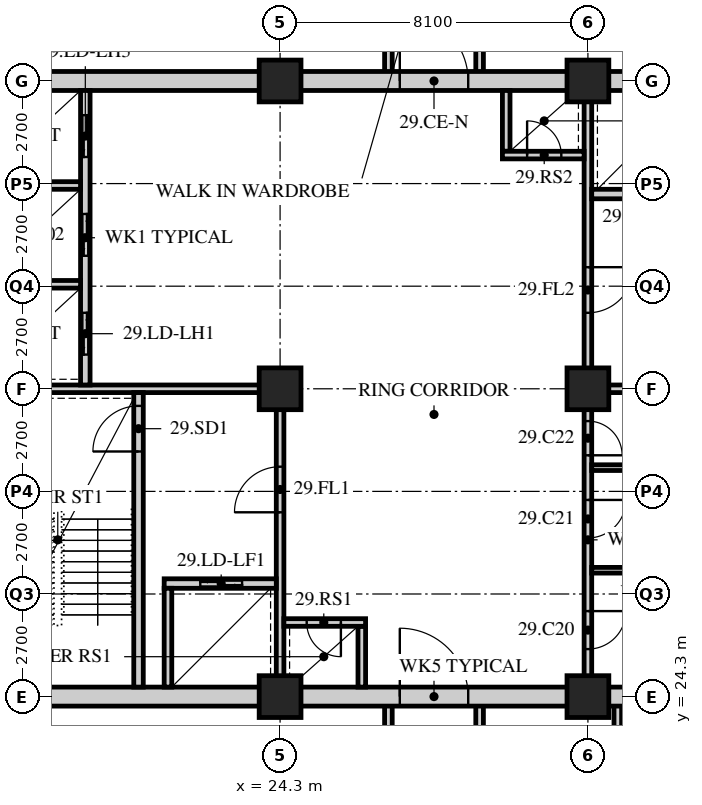
"""IFC4 building model, lengths in metres.
Left out: names, types, materials, properties, quantities, classifications, styles, units other than length and angle.
Written with IfcOpenShell. Run it as: python <this file> out.ifc"""

import sys

from ifc_helpers import new_model, si_unit, direction, frame, frame_2d, origin, origin_2d, place, context, subcontext, project, spatial, rectangle, hollow_rectangle, extrude, element, fill, save


model = new_model("IFC4")
c1 = context("Model", 3, precision=1e-05, world=origin(), true_north=direction((0.0, 1.0)))
c2 = subcontext(c1, "Body", "Model", "MODEL_VIEW")
j1 = project(units=[si_unit("LENGTHUNIT", "METRE"), si_unit("PLANEANGLEUNIT", "RADIAN")], contexts=[c1])
p1 = place(None, origin())
s1 = spatial("IfcSite", under=j1, at=p1, CompositionType="ELEMENT")
p2 = place(p1, origin())
s2 = spatial("IfcBuilding", under=s1, at=p2, CompositionType="ELEMENT")
p3 = place(p2, frame((0.0, 0.0, 117.0)))
s3 = spatial("IfcBuildingStorey", under=s2, at=p3, CompositionType="ELEMENT", Elevation=117.0)
for number, where, z_axis, x_axis in (
    (1, (24.3, 24.3, 0.0), (0.0, 0.0, 1.0), (1.0, 0.0, 0.0)),
    (2, (24.3, 32.4, 0.0), (0.0, 0.0, 1.0), (1.0, 0.0, 0.0)),
    (3, (24.3, 40.5, 0.0), (0.0, 0.0, 1.0), (1.0, 0.0, 0.0)),
    (4, (32.4, 24.3, 0.0), (0.0, 0.0, 1.0), (1.0, 0.0, 0.0)),
    (5, (32.4, 32.4, 0.0), (0.0, 0.0, 1.0), (1.0, 0.0, 0.0)),
    (6, (32.4, 40.5, 0.0), (0.0, 0.0, 1.0), (1.0, 0.0, 0.0)),
):
    element("IfcColumn", number, at=place(p3, frame(where, z_axis=z_axis, x_axis=x_axis)), inside=s3, PredefinedType="COLUMN", context=c2, shape_type="SweptSolid", body=[
        extrude(hollow_rectangle(XDim=1.1, YDim=1.1, WallThickness=0.1, at=origin_2d()), origin(), (0.0, 0.0, 1.0), 3.4),
    ])
for number, where, z_axis, x_axis in (
    (7, (33.186, 19.35, 0.0), (0.0, 0.0, 1.0), (0.0, 1.0, 0.0)),
    (8, (27.15, 19.35, 0.0), (0.0, 0.0, 1.0), (0.0, 1.0, 0.0)),
    (9, (29.55, 19.35, 0.0), (0.0, 0.0, 1.0), (0.0, 1.0, 0.0)),
):
    element("IfcWall", number, at=place(p3, frame(where, z_axis=z_axis, x_axis=x_axis)), inside=s3, PredefinedType="SOLIDWALL", context=c2, shape_type="SweptSolid", body=[
        extrude(rectangle(XDim=4.95, YDim=0.2, at=frame_2d((2.475, 0.0))), origin(), (0.0, 0.0, 1.0), 3.19),
    ])
for number, where, z_axis, x_axis in (
    (10, (27.15, 40.5, 0.0), (0.0, 0.0, 1.0), (0.0, 1.0, 0.0)),
    (11, (29.55, 40.5, 0.0), (0.0, 0.0, 1.0), (0.0, 1.0, 0.0)),
):
    element("IfcWall", number, at=place(p3, frame(where, z_axis=z_axis, x_axis=x_axis)), inside=s3, PredefinedType="SOLIDWALL", context=c2, shape_type="SweptSolid", body=[
        extrude(rectangle(XDim=3.6, YDim=0.2, at=frame_2d((1.8, 0.0))), origin(), (0.0, 0.0, 1.0), 3.19),
    ])
p4 = place(p3, frame((15.95, 24.3, 0.0), z_axis=(0.0, 0.0, 1.0), x_axis=(1.0, 0.0, 0.0)))
e12 = element("IfcWall", 12, at=p4, inside=s3, PredefinedType="SOLIDWALL", context=c2, shape_type="SweptSolid", body=[
    extrude(rectangle(XDim=24.8, YDim=0.5, at=frame_2d((12.4, 0.0))), origin(), (0.0, 0.0, 1.0), 2.54),
])
p5 = place(p4, frame((11.5, 0.0, 0.0)))
e13 = element("IfcOpeningElement", 13, at=p5, cuts=e12, PredefinedType="OPENING", context=c2, shape_type="SweptSolid", body=[
    extrude(rectangle(XDim=1.8, YDim=2.4, at=frame_2d((0.9, 1.2))), frame((0.0, 0.26, 0.0), z_axis=(0.0, -1.0, 0.0), x_axis=(1.0, 0.0, 0.0)), (0.0, 0.0, 1.0), 0.52),
])
p6 = place(p3, frame((15.95, 40.5, 0.0), z_axis=(0.0, 0.0, 1.0), x_axis=(1.0, 0.0, 0.0)))
e14 = element("IfcWall", 14, at=p6, inside=s3, PredefinedType="SOLIDWALL", context=c2, shape_type="SweptSolid", body=[
    extrude(rectangle(XDim=24.8, YDim=0.5, at=frame_2d((12.4, 0.0))), origin(), (0.0, 0.0, 1.0), 2.54),
])
p7 = place(p6, frame((11.5, 0.0, 0.0)))
e15 = element("IfcOpeningElement", 15, at=p7, cuts=e14, PredefinedType="OPENING", context=c2, shape_type="SweptSolid", body=[
    extrude(rectangle(XDim=1.8, YDim=2.4, at=frame_2d((0.9, 1.2))), frame((0.0, 0.26, 0.0), z_axis=(0.0, -1.0, 0.0), x_axis=(1.0, 0.0, 0.0)), (0.0, 0.0, 1.0), 0.52),
])
p8 = place(p3, frame((16.45, 32.4, 0.0), z_axis=(0.0, 0.0, 1.0), x_axis=(1.0, 0.0, 0.0)))
e16 = element("IfcWall", 16, at=p8, inside=s3, PredefinedType="SOLIDWALL", context=c2, shape_type="SweptSolid", body=[
    extrude(rectangle(XDim=7.95, YDim=0.2, at=frame_2d((3.975, 0.0))), origin(), (0.0, 0.0, 1.0), 2.578),
])
p9 = place(p3, frame((24.3, 24.55, 0.0), z_axis=(0.0, 0.0, 1.0), x_axis=(0.0, 1.0, 0.0)))
e17 = element("IfcWall", 17, at=p9, inside=s3, PredefinedType="SOLIDWALL", context=c2, shape_type="SweptSolid", body=[
    extrude(rectangle(XDim=7.75, YDim=0.2, at=frame_2d((3.875, 0.0))), origin(), (0.0, 0.0, 1.0), 2.578),
])
p10 = place(p9, frame((4.6, 0.0, 0.0)))
e18 = element("IfcOpeningElement", 18, at=p10, cuts=e17, PredefinedType="OPENING", context=c2, shape_type="SweptSolid", body=[
    extrude(rectangle(XDim=1.2, YDim=2.1, at=frame_2d((0.6, 1.05))), frame((0.0, 0.11, 0.0), z_axis=(0.0, -1.0, 0.0), x_axis=(1.0, 0.0, 0.0)), (0.0, 0.0, 1.0), 0.22),
])
p11 = place(p3, frame((20.575, 24.55, 0.0), z_axis=(0.0, 0.0, 1.0), x_axis=(0.0, 1.0, 0.0)))
e19 = element("IfcWall", 19, at=p11, inside=s3, PredefinedType="SOLIDWALL", context=c2, shape_type="SweptSolid", body=[
    extrude(rectangle(XDim=7.75, YDim=0.25, at=frame_2d((3.875, 0.0))), origin(), (0.0, 0.0, 1.0), 3.19),
])
p12 = place(p11, frame((6.2, 0.0, 0.0)))
e20 = element("IfcOpeningElement", 20, at=p12, cuts=e19, PredefinedType="OPENING", context=c2, shape_type="SweptSolid", body=[
    extrude(rectangle(XDim=1.2, YDim=2.1, at=frame_2d((0.6, 1.05))), frame((0.0, 0.135, 0.0), z_axis=(0.0, -1.0, 0.0), x_axis=(1.0, 0.0, 0.0)), (0.0, 0.0, 1.0), 0.27),
])
p13 = place(p3, frame((21.25, 27.275, 0.0), z_axis=(0.0, 0.0, 1.0), x_axis=(1.0, 0.0, 0.0)))
e21 = element("IfcWall", 21, at=p13, inside=s3, PredefinedType="SOLIDWALL", context=c2, shape_type="SweptSolid", body=[
    extrude(rectangle(XDim=2.95, YDim=0.25, at=frame_2d((1.475, 0.0))), origin(), (0.0, 0.0, 1.0), 3.19),
])
p14 = place(p13, frame((0.95, 0.0, 0.0)))
e22 = element("IfcOpeningElement", 22, at=p14, cuts=e21, PredefinedType="OPENING", context=c2, shape_type="SweptSolid", body=[
    extrude(rectangle(XDim=1.1, YDim=2.4, at=frame_2d((0.55, 1.2))), frame((0.0, 0.135, 0.0), z_axis=(0.0, -1.0, 0.0), x_axis=(1.0, 0.0, 0.0)), (0.0, 0.0, 1.0), 0.27),
])
p15 = place(p3, frame((21.35, 24.55, 0.0), z_axis=(0.0, 0.0, 1.0), x_axis=(0.0, 1.0, 0.0)))
e23 = element("IfcWall", 23, at=p15, inside=s3, PredefinedType="SOLIDWALL", context=c2, shape_type="SweptSolid", body=[
    extrude(rectangle(XDim=2.6, YDim=0.2, at=frame_2d((1.3, 0.0))), origin(), (0.0, 0.0, 1.0), 3.19),
])
p16 = place(p3, frame((19.175, 32.5, 0.0), z_axis=(0.0, 0.0, 1.0), x_axis=(0.0, 1.0, 0.0)))
e24 = element("IfcWall", 24, at=p16, inside=s3, PredefinedType="SOLIDWALL", context=c2, shape_type="SweptSolid", body=[
    extrude(rectangle(XDim=7.75, YDim=0.25, at=frame_2d((3.875, 0.0))), origin(), (0.0, 0.0, 1.0), 3.19),
])
p17 = place(p16, frame((0.8, 0.0, 0.0)))
e25 = element("IfcOpeningElement", 25, at=p17, cuts=e24, PredefinedType="OPENING", context=c2, shape_type="SweptSolid", body=[
    extrude(rectangle(XDim=1.1, YDim=2.4, at=frame_2d((0.55, 1.2))), frame((0.0, 0.135, 0.0), z_axis=(0.0, -1.0, 0.0), x_axis=(1.0, 0.0, 0.0)), (0.0, 0.0, 1.0), 0.27),
])
p18 = place(p16, frame((3.4, 0.0, 0.0)))
e26 = element("IfcOpeningElement", 26, at=p18, cuts=e24, PredefinedType="OPENING", context=c2, shape_type="SweptSolid", body=[
    extrude(rectangle(XDim=1.1, YDim=2.4, at=frame_2d((0.55, 1.2))), frame((0.0, 0.135, 0.0), z_axis=(0.0, -1.0, 0.0), x_axis=(1.0, 0.0, 0.0)), (0.0, 0.0, 1.0), 0.27),
])
p19 = place(p16, frame((6.0, 0.0, 0.0)))
e27 = element("IfcOpeningElement", 27, at=p19, cuts=e24, PredefinedType="OPENING", context=c2, shape_type="SweptSolid", body=[
    extrude(rectangle(XDim=1.1, YDim=2.4, at=frame_2d((0.55, 1.2))), frame((0.0, 0.135, 0.0), z_axis=(0.0, -1.0, 0.0), x_axis=(1.0, 0.0, 0.0)), (0.0, 0.0, 1.0), 0.27),
])
for number, where, z_axis, x_axis in (
    (28, (16.45, 35.15, 0.0), (0.0, 0.0, 1.0), (1.0, 0.0, 0.0)),
    (29, (16.45, 37.75, 0.0), (0.0, 0.0, 1.0), (1.0, 0.0, 0.0)),
):
    element("IfcWall", number, at=place(p3, frame(where, z_axis=z_axis, x_axis=x_axis)), inside=s3, PredefinedType="SOLIDWALL", context=c2, shape_type="SweptSolid", body=[
        extrude(rectangle(XDim=2.6, YDim=0.2, at=frame_2d((1.3, 0.0))), origin(), (0.0, 0.0, 1.0), 3.19),
    ])
p20 = place(p3, frame((26.45, 24.55, 0.0), z_axis=(0.0, 0.0, 1.0), x_axis=(0.0, 1.0, 0.0)))
e30 = element("IfcWall", 30, at=p20, inside=s3, PredefinedType="SOLIDWALL", context=c2, shape_type="SweptSolid", body=[
    extrude(rectangle(XDim=1.6, YDim=0.2, at=frame_2d((0.8, 0.0))), origin(), (0.0, 0.0, 1.0), 3.19),
])
p21 = place(p3, frame((24.4, 26.25, 0.0), z_axis=(0.0, 0.0, 1.0), x_axis=(1.0, 0.0, 0.0)))
e31 = element("IfcWall", 31, at=p21, inside=s3, PredefinedType="SOLIDWALL", context=c2, shape_type="SweptSolid", body=[
    extrude(rectangle(XDim=2.15, YDim=0.2, at=frame_2d((1.075, 0.0))), origin(), (0.0, 0.0, 1.0), 3.19),
])
p22 = place(p21, frame((0.6, 0.0, 0.0)))
e32 = element("IfcOpeningElement", 32, at=p22, cuts=e31, PredefinedType="OPENING", context=c2, shape_type="SweptSolid", body=[
    extrude(rectangle(XDim=0.9, YDim=2.1, at=frame_2d((0.45, 1.05))), frame((0.0, 0.11, 0.0), z_axis=(0.0, -1.0, 0.0), x_axis=(1.0, 0.0, 0.0)), (0.0, 0.0, 1.0), 0.22),
])
p23 = place(p3, frame((32.3, 32.4, 0.0), z_axis=(0.0, 0.0, 1.0), x_axis=(1.0, 0.0, 0.0)))
e33 = element("IfcWall", 33, at=p23, inside=s3, PredefinedType="SOLIDWALL", context=c2, shape_type="SweptSolid", body=[
    extrude(rectangle(XDim=7.95, YDim=0.2, at=frame_2d((3.975, 0.0))), origin(), (0.0, 0.0, 1.0), 2.578),
])
p24 = place(p3, frame((32.4, 32.5, 0.0), z_axis=(0.0, 0.0, 1.0), x_axis=(0.0, 1.0, 0.0)))
e34 = element("IfcWall", 34, at=p24, inside=s3, PredefinedType="SOLIDWALL", context=c2, shape_type="SweptSolid", body=[
    extrude(rectangle(XDim=7.75, YDim=0.2, at=frame_2d((3.875, 0.0))), origin(), (0.0, 0.0, 1.0), 2.578),
])
p25 = place(p24, frame((1.9, 0.0, 0.0)))
e35 = element("IfcOpeningElement", 35, at=p25, cuts=e34, PredefinedType="OPENING", context=c2, shape_type="SweptSolid", body=[
    extrude(rectangle(XDim=1.2, YDim=2.1, at=frame_2d((0.6, 1.05))), frame((0.0, 0.11, 0.0), z_axis=(0.0, -1.0, 0.0), x_axis=(1.0, 0.0, 0.0)), (0.0, 0.0, 1.0), 0.22),
])
p26 = place(p3, frame((32.5, 37.525, 0.0), z_axis=(0.0, 0.0, 1.0), x_axis=(1.0, 0.0, 0.0)))
e36 = element("IfcWall", 36, at=p26, inside=s3, PredefinedType="SOLIDWALL", context=c2, shape_type="SweptSolid", body=[
    extrude(rectangle(XDim=2.95, YDim=0.25, at=frame_2d((1.475, 0.0))), origin(), (0.0, 0.0, 1.0), 3.19),
])
p27 = place(p26, frame((0.9, 0.0, 0.0)))
e37 = element("IfcOpeningElement", 37, at=p27, cuts=e36, PredefinedType="OPENING", context=c2, shape_type="SweptSolid", body=[
    extrude(rectangle(XDim=1.1, YDim=2.4, at=frame_2d((0.55, 1.2))), frame((0.0, 0.135, 0.0), z_axis=(0.0, -1.0, 0.0), x_axis=(1.0, 0.0, 0.0)), (0.0, 0.0, 1.0), 0.27),
])
p28 = place(p3, frame((30.25, 38.65, 0.0), z_axis=(0.0, 0.0, 1.0), x_axis=(0.0, 1.0, 0.0)))
e38 = element("IfcWall", 38, at=p28, inside=s3, PredefinedType="SOLIDWALL", context=c2, shape_type="SweptSolid", body=[
    extrude(rectangle(XDim=1.6, YDim=0.2, at=frame_2d((0.8, 0.0))), origin(), (0.0, 0.0, 1.0), 3.19),
])
p29 = place(p3, frame((30.15, 38.55, 0.0), z_axis=(0.0, 0.0, 1.0), x_axis=(1.0, 0.0, 0.0)))
e39 = element("IfcWall", 39, at=p29, inside=s3, PredefinedType="SOLIDWALL", context=c2, shape_type="SweptSolid", body=[
    extrude(rectangle(XDim=2.15, YDim=0.2, at=frame_2d((1.075, 0.0))), origin(), (0.0, 0.0, 1.0), 3.19),
])
p30 = place(p29, frame((0.65, 0.0, 0.0)))
e40 = element("IfcOpeningElement", 40, at=p30, cuts=e39, PredefinedType="OPENING", context=c2, shape_type="SweptSolid", body=[
    extrude(rectangle(XDim=0.9, YDim=2.1, at=frame_2d((0.45, 1.05))), frame((0.0, 0.11, 0.0), z_axis=(0.0, -1.0, 0.0), x_axis=(1.0, 0.0, 0.0)), (0.0, 0.0, 1.0), 0.22),
])
p31 = place(p3, frame((32.4, 24.55, 0.0), z_axis=(0.0, 0.0, 1.0), x_axis=(0.0, 1.0, 0.0)))
e41 = element("IfcWall", 41, at=p31, inside=s3, PredefinedType="PARTITIONING", context=c2, shape_type="SweptSolid", body=[
    extrude(rectangle(XDim=7.75, YDim=0.2, at=frame_2d((3.875, 0.0))), origin(), (0.0, 0.0, 1.0), 2.578),
])
p32 = place(p31, frame((1.0, 0.0, 0.0)))
e42 = element("IfcOpeningElement", 42, at=p32, cuts=e41, PredefinedType="OPENING", context=c2, shape_type="SweptSolid", body=[
    extrude(rectangle(XDim=1.0, YDim=2.1, at=frame_2d((0.5, 1.05))), frame((0.0, 0.11, 0.0), z_axis=(0.0, -1.0, 0.0), x_axis=(1.0, 0.0, 0.0)), (0.0, 0.0, 1.0), 0.22),
])
p33 = place(p31, frame((3.925, 0.0, 0.0)))
e43 = element("IfcOpeningElement", 43, at=p33, cuts=e41, PredefinedType="OPENING", context=c2, shape_type="SweptSolid", body=[
    extrude(rectangle(XDim=1.0, YDim=2.1, at=frame_2d((0.5, 1.05))), frame((0.0, 0.11, 0.0), z_axis=(0.0, -1.0, 0.0), x_axis=(1.0, 0.0, 0.0)), (0.0, 0.0, 1.0), 0.22),
])
p34 = place(p31, frame((6.1, 0.0, 0.0)))
e44 = element("IfcOpeningElement", 44, at=p34, cuts=e41, PredefinedType="OPENING", context=c2, shape_type="SweptSolid", body=[
    extrude(rectangle(XDim=0.9, YDim=2.1, at=frame_2d((0.45, 1.05))), frame((0.0, 0.11, 0.0), z_axis=(0.0, -1.0, 0.0), x_axis=(1.0, 0.0, 0.0)), (0.0, 0.0, 1.0), 0.22),
])
for number, where, z_axis, x_axis in (
    (45, (32.5, 27.625, 0.0), (0.0, 0.0, 1.0), (1.0, 0.0, 0.0)),
    (46, (32.5, 30.325, 0.0), (0.0, 0.0, 1.0), (1.0, 0.0, 0.0)),
):
    element("IfcWall", number, at=place(p3, frame(where, z_axis=z_axis, x_axis=x_axis)), inside=s3, PredefinedType="PARTITIONING", context=c2, shape_type="SweptSolid", body=[
        extrude(rectangle(XDim=4.9, YDim=0.15, at=frame_2d((2.45, 0.0))), origin(), (0.0, 0.0, 1.0), 3.19),
    ])
p35 = place(p32, origin())
e47 = element("IfcDoor", 47, at=p35, inside=s3, OperationType="SINGLE_SWING_LEFT", PredefinedType="DOOR", context=c2, shape_type="SweptSolid", body=[
    extrude(rectangle(XDim=1.0, YDim=2.1, at=frame_2d((0.5, 1.05))), frame((0.0, 0.025, 0.0), z_axis=(0.0, -1.0, 0.0), x_axis=(1.0, 0.0, 0.0)), (0.0, 0.0, 1.0), 0.05),
])
fill(e42, e47)
p36 = place(p33, origin())
e48 = element("IfcDoor", 48, at=p36, inside=s3, OperationType="SINGLE_SWING_LEFT", PredefinedType="DOOR", context=c2, shape_type="SweptSolid", body=[
    extrude(rectangle(XDim=1.0, YDim=2.1, at=frame_2d((0.5, 1.05))), frame((0.0, 0.025, 0.0), z_axis=(0.0, -1.0, 0.0), x_axis=(1.0, 0.0, 0.0)), (0.0, 0.0, 1.0), 0.05),
])
fill(e43, e48)
p37 = place(p34, origin())
e49 = element("IfcDoor", 49, at=p37, inside=s3, OperationType="SINGLE_SWING_RIGHT", PredefinedType="DOOR", context=c2, shape_type="SweptSolid", body=[
    extrude(rectangle(XDim=0.9, YDim=2.1, at=frame_2d((0.45, 1.05))), frame((0.0, 0.025, 0.0), z_axis=(0.0, -1.0, 0.0), x_axis=(1.0, 0.0, 0.0)), (0.0, 0.0, 1.0), 0.05),
])
fill(e44, e49)
p38 = place(p12, origin())
e50 = element("IfcDoor", 50, at=p38, inside=s3, OperationType="SINGLE_SWING_LEFT", PredefinedType="DOOR", context=c2, shape_type="SweptSolid", body=[
    extrude(rectangle(XDim=1.2, YDim=2.1, at=frame_2d((0.6, 1.05))), frame((0.0, 0.025, 0.0), z_axis=(0.0, -1.0, 0.0), x_axis=(1.0, 0.0, 0.0)), (0.0, 0.0, 1.0), 0.05),
])
fill(e20, e50)
p39 = place(p10, origin())
e51 = element("IfcDoor", 51, at=p39, inside=s3, OperationType="SINGLE_SWING_LEFT", PredefinedType="DOOR", context=c2, shape_type="SweptSolid", body=[
    extrude(rectangle(XDim=1.2, YDim=2.1, at=frame_2d((0.6, 1.05))), frame((0.0, 0.025, 0.0), z_axis=(0.0, -1.0, 0.0), x_axis=(1.0, 0.0, 0.0)), (0.0, 0.0, 1.0), 0.05),
])
fill(e18, e51)
p40 = place(p22, origin())
e52 = element("IfcDoor", 52, at=p40, inside=s3, OperationType="SINGLE_SWING_LEFT", PredefinedType="DOOR", context=c2, shape_type="SweptSolid", body=[
    extrude(rectangle(XDim=0.9, YDim=2.1, at=frame_2d((0.45, 1.05))), frame((0.0, 0.025, 0.0), z_axis=(0.0, -1.0, 0.0), x_axis=(1.0, 0.0, 0.0)), (0.0, 0.0, 1.0), 0.05),
])
fill(e32, e52)
p41 = place(p25, origin())
e53 = element("IfcDoor", 53, at=p41, inside=s3, OperationType="SINGLE_SWING_LEFT", PredefinedType="DOOR", context=c2, shape_type="SweptSolid", body=[
    extrude(rectangle(XDim=1.2, YDim=2.1, at=frame_2d((0.6, 1.05))), frame((0.0, 0.025, 0.0), z_axis=(0.0, -1.0, 0.0), x_axis=(1.0, 0.0, 0.0)), (0.0, 0.0, 1.0), 0.05),
])
fill(e35, e53)
p42 = place(p30, origin())
e54 = element("IfcDoor", 54, at=p42, inside=s3, OperationType="SINGLE_SWING_LEFT", PredefinedType="DOOR", context=c2, shape_type="SweptSolid", body=[
    extrude(rectangle(XDim=0.9, YDim=2.1, at=frame_2d((0.45, 1.05))), frame((0.0, 0.025, 0.0), z_axis=(0.0, -1.0, 0.0), x_axis=(1.0, 0.0, 0.0)), (0.0, 0.0, 1.0), 0.05),
])
fill(e40, e54)
p43 = place(p17, origin())
e55 = element("IfcDoor", 55, at=p43, inside=s3, OperationType="DOUBLE_DOOR_SLIDING", PredefinedType="DOOR", context=c2, shape_type="SweptSolid", body=[
    extrude(rectangle(XDim=1.1, YDim=2.4, at=frame_2d((0.55, 1.2))), frame((0.0, 0.025, 0.0), z_axis=(0.0, -1.0, 0.0), x_axis=(1.0, 0.0, 0.0)), (0.0, 0.0, 1.0), 0.05),
])
fill(e25, e55)
p44 = place(p18, origin())
e56 = element("IfcDoor", 56, at=p44, inside=s3, OperationType="DOUBLE_DOOR_SLIDING", PredefinedType="DOOR", context=c2, shape_type="SweptSolid", body=[
    extrude(rectangle(XDim=1.1, YDim=2.4, at=frame_2d((0.55, 1.2))), frame((0.0, 0.025, 0.0), z_axis=(0.0, -1.0, 0.0), x_axis=(1.0, 0.0, 0.0)), (0.0, 0.0, 1.0), 0.05),
])
fill(e26, e56)
p45 = place(p19, origin())
e57 = element("IfcDoor", 57, at=p45, inside=s3, OperationType="DOUBLE_DOOR_SLIDING", PredefinedType="DOOR", context=c2, shape_type="SweptSolid", body=[
    extrude(rectangle(XDim=1.1, YDim=2.4, at=frame_2d((0.55, 1.2))), frame((0.0, 0.025, 0.0), z_axis=(0.0, -1.0, 0.0), x_axis=(1.0, 0.0, 0.0)), (0.0, 0.0, 1.0), 0.05),
])
fill(e27, e57)
p46 = place(p14, origin())
e58 = element("IfcDoor", 58, at=p46, inside=s3, OperationType="DOUBLE_DOOR_SLIDING", PredefinedType="DOOR", context=c2, shape_type="SweptSolid", body=[
    extrude(rectangle(XDim=1.1, YDim=2.4, at=frame_2d((0.55, 1.2))), frame((0.0, 0.025, 0.0), z_axis=(0.0, -1.0, 0.0), x_axis=(1.0, 0.0, 0.0)), (0.0, 0.0, 1.0), 0.05),
])
fill(e22, e58)
p47 = place(p5, origin())
e59 = element("IfcDoor", 59, at=p47, inside=s3, OperationType="DOUBLE_DOOR_SINGLE_SWING", PredefinedType="DOOR", context=c2, shape_type="SweptSolid", body=[
    extrude(rectangle(XDim=1.8, YDim=2.4, at=frame_2d((0.9, 1.2))), frame((0.0, 0.025, 0.0), z_axis=(0.0, -1.0, 0.0), x_axis=(1.0, 0.0, 0.0)), (0.0, 0.0, 1.0), 0.05),
])
fill(e13, e59)
p48 = place(p7, origin())
e60 = element("IfcDoor", 60, at=p48, inside=s3, OperationType="DOUBLE_DOOR_SINGLE_SWING", PredefinedType="DOOR", context=c2, shape_type="SweptSolid", body=[
    extrude(rectangle(XDim=1.8, YDim=2.4, at=frame_2d((0.9, 1.2))), frame((0.0, 0.025, 0.0), z_axis=(0.0, -1.0, 0.0), x_axis=(1.0, 0.0, 0.0)), (0.0, 0.0, 1.0), 0.05),
])
fill(e15, e60)
save(model, sys.argv[1])
